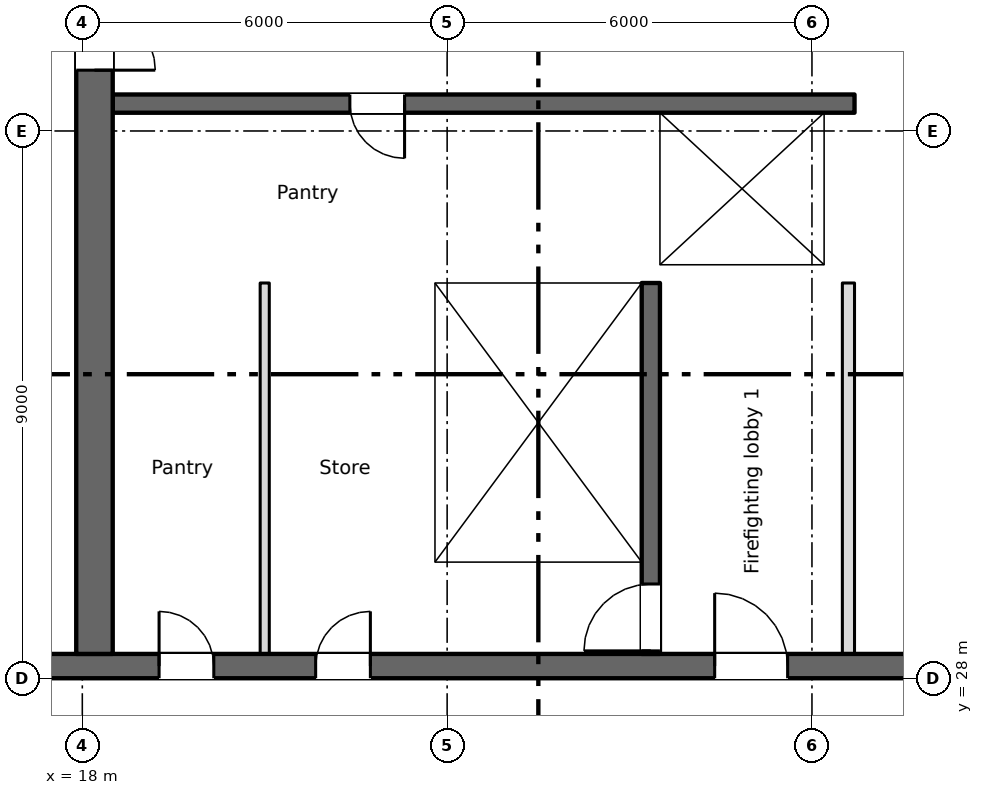
"""IFC4 building model, lengths in metres.
Left out: names, types, materials, properties, quantities, classifications, styles, units other than length and angle.
Written with IfcOpenShell. Run it as: python <this file> out.ifc"""

import sys

from ifc_helpers import new_model, si_unit, direction, frame, frame_2d, origin, place, context, subcontext, project, spatial, rectangle, extrude, element, fill, save


model = new_model("IFC4")
c1 = context("Model", 3, precision=1e-05, world=origin(), true_north=direction((0.0, 1.0)))
c2 = subcontext(c1, "Body", "Model", "MODEL_VIEW")
j1 = project(units=[si_unit("LENGTHUNIT", "METRE"), si_unit("PLANEANGLEUNIT", "RADIAN")], contexts=[c1])
p1 = place(None, origin())
s1 = spatial("IfcSite", under=j1, at=p1, CompositionType="ELEMENT")
p2 = place(p1, origin())
s2 = spatial("IfcBuilding", under=s1, at=p2, CompositionType="ELEMENT")
p3 = place(p2, frame((0.0, 0.0, 258.35)))
s3 = spatial("IfcBuildingStorey", under=s2, at=p3, CompositionType="ELEMENT", Elevation=258.35)
p4 = place(p3, frame((6.5, 28.2, 0.0), z_axis=(0.0, 0.0, 1.0), x_axis=(1.0, 0.0, 0.0)))
e1 = element("IfcWall", 1, at=p4, inside=s3, PredefinedType="SHEAR", context=c2, shape_type="SweptSolid", body=[
    extrude(rectangle(XDim=58.0, YDim=0.4, at=frame_2d((29.0, 0.0))), origin(), (0.0, 0.0, 1.0), 3.4),
])
p5 = place(p4, frame((12.762, 0.0, 0.0)))
e2 = element("IfcOpeningElement", 2, at=p5, cuts=e1, PredefinedType="OPENING", context=c2, shape_type="SweptSolid", body=[
    extrude(rectangle(XDim=0.9, YDim=2.1, at=frame_2d((0.45, 1.05))), frame((0.0, 0.21, 0.0), z_axis=(0.0, -1.0, 0.0), x_axis=(1.0, 0.0, 0.0)), (0.0, 0.0, 1.0), 0.42),
])
p6 = place(p4, frame((15.337, 0.0, 0.0)))
e3 = element("IfcOpeningElement", 3, at=p6, cuts=e1, PredefinedType="OPENING", context=c2, shape_type="SweptSolid", body=[
    extrude(rectangle(XDim=0.9, YDim=2.1, at=frame_2d((0.45, 1.05))), frame((0.0, 0.21, 0.0), z_axis=(0.0, -1.0, 0.0), x_axis=(1.0, 0.0, 0.0)), (0.0, 0.0, 1.0), 0.42),
])
p7 = place(p4, frame((50.05, 0.0, 0.0)))
e4 = element("IfcOpeningElement", 4, at=p7, cuts=e1, PredefinedType="OPENING", context=c2, shape_type="SweptSolid", body=[
    extrude(rectangle(XDim=0.9, YDim=2.1, at=frame_2d((0.45, 1.05))), frame((0.0, 0.21, 0.0), z_axis=(0.0, -1.0, 0.0), x_axis=(1.0, 0.0, 0.0)), (0.0, 0.0, 1.0), 0.42),
])
p8 = place(p4, frame((0.762, 0.0, 0.0)))
e5 = element("IfcOpeningElement", 5, at=p8, cuts=e1, PredefinedType="OPENING", context=c2, shape_type="SweptSolid", body=[
    extrude(rectangle(XDim=0.9, YDim=2.1, at=frame_2d((0.45, 1.05))), frame((0.0, 0.21, 0.0), z_axis=(0.0, -1.0, 0.0), x_axis=(1.0, 0.0, 0.0)), (0.0, 0.0, 1.0), 0.42),
])
p9 = place(p4, frame((2.337, 0.0, 0.0)))
e6 = element("IfcOpeningElement", 6, at=p9, cuts=e1, PredefinedType="OPENING", context=c2, shape_type="SweptSolid", body=[
    extrude(rectangle(XDim=0.9, YDim=2.1, at=frame_2d((0.45, 1.05))), frame((0.0, 0.21, 0.0), z_axis=(0.0, -1.0, 0.0), x_axis=(1.0, 0.0, 0.0)), (0.0, 0.0, 1.0), 0.42),
])
p10 = place(p4, frame((4.9, 0.0, 0.0)))
e7 = element("IfcOpeningElement", 7, at=p10, cuts=e1, PredefinedType="OPENING", context=c2, shape_type="SweptSolid", body=[
    extrude(rectangle(XDim=1.2, YDim=2.1, at=frame_2d((0.6, 1.05))), frame((0.0, 0.21, 0.0), z_axis=(0.0, -1.0, 0.0), x_axis=(1.0, 0.0, 0.0)), (0.0, 0.0, 1.0), 0.42),
])
p11 = place(p4, frame((31.9, 0.0, 0.0)))
e8 = element("IfcOpeningElement", 8, at=p11, cuts=e1, PredefinedType="OPENING", context=c2, shape_type="SweptSolid", body=[
    extrude(rectangle(XDim=1.2, YDim=2.1, at=frame_2d((0.6, 1.05))), frame((0.0, 0.21, 0.0), z_axis=(0.0, -1.0, 0.0), x_axis=(1.0, 0.0, 0.0)), (0.0, 0.0, 1.0), 0.42),
])
p12 = place(p4, frame((55.4, 0.0, 0.0)))
e9 = element("IfcOpeningElement", 9, at=p12, cuts=e1, PredefinedType="OPENING", context=c2, shape_type="SweptSolid", body=[
    extrude(rectangle(XDim=1.2, YDim=2.1, at=frame_2d((0.6, 1.05))), frame((0.0, 0.21, 0.0), z_axis=(0.0, -1.0, 0.0), x_axis=(1.0, 0.0, 0.0)), (0.0, 0.0, 1.0), 0.42),
])
p13 = place(p4, frame((21.9, 0.0, 0.0)))
e10 = element("IfcOpeningElement", 10, at=p13, cuts=e1, PredefinedType="OPENING", context=c2, shape_type="SweptSolid", body=[
    extrude(rectangle(XDim=1.2, YDim=2.1, at=frame_2d((0.6, 1.05))), frame((0.0, 0.21, 0.0), z_axis=(0.0, -1.0, 0.0), x_axis=(1.0, 0.0, 0.0)), (0.0, 0.0, 1.0), 0.42),
])
p14 = place(p4, frame((41.9, 0.0, 0.0)))
e11 = element("IfcOpeningElement", 11, at=p14, cuts=e1, PredefinedType="OPENING", context=c2, shape_type="SweptSolid", body=[
    extrude(rectangle(XDim=1.2, YDim=2.1, at=frame_2d((0.6, 1.05))), frame((0.0, 0.21, 0.0), z_axis=(0.0, -1.0, 0.0), x_axis=(1.0, 0.0, 0.0)), (0.0, 0.0, 1.0), 0.42),
])
p15 = place(p4, frame((25.05, 0.0, 0.0)))
e12 = element("IfcOpeningElement", 12, at=p15, cuts=e1, PredefinedType="OPENING", context=c2, shape_type="SweptSolid", body=[
    extrude(rectangle(XDim=2.4, YDim=2.1, at=frame_2d((1.2, 1.05))), frame((0.0, 0.21, 0.0), z_axis=(0.0, -1.0, 0.0), x_axis=(1.0, 0.0, 0.0)), (0.0, 0.0, 1.0), 0.42),
])
p16 = place(p4, frame((37.55, 0.0, 0.0)))
e13 = element("IfcOpeningElement", 13, at=p16, cuts=e1, PredefinedType="OPENING", context=c2, shape_type="SweptSolid", body=[
    extrude(rectangle(XDim=2.4, YDim=2.1, at=frame_2d((1.2, 1.05))), frame((0.0, 0.21, 0.0), z_axis=(0.0, -1.0, 0.0), x_axis=(1.0, 0.0, 0.0)), (0.0, 0.0, 1.0), 0.42),
])
p17 = place(p4, frame((8.25, 0.0, 0.0)))
e14 = element("IfcOpeningElement", 14, at=p17, cuts=e1, PredefinedType="OPENING", context=c2, shape_type="SweptSolid", body=[
    extrude(rectangle(XDim=2.4, YDim=2.1, at=frame_2d((1.2, 1.05))), frame((0.0, 0.21, 0.0), z_axis=(0.0, -1.0, 0.0), x_axis=(1.0, 0.0, 0.0)), (0.0, 0.0, 1.0), 0.42),
])
p18 = place(p4, frame((29.05, 0.0, 0.0)))
e15 = element("IfcOpeningElement", 15, at=p18, cuts=e1, PredefinedType="OPENING", context=c2, shape_type="SweptSolid", body=[
    extrude(rectangle(XDim=0.9, YDim=2.1, at=frame_2d((0.45, 1.05))), frame((0.0, 0.21, 0.0), z_axis=(0.0, -1.0, 0.0), x_axis=(1.0, 0.0, 0.0)), (0.0, 0.0, 1.0), 0.42),
])
p19 = place(p4, frame((35.05, 0.0, 0.0)))
e16 = element("IfcOpeningElement", 16, at=p19, cuts=e1, PredefinedType="OPENING", context=c2, shape_type="SweptSolid", body=[
    extrude(rectangle(XDim=0.9, YDim=2.1, at=frame_2d((0.45, 1.05))), frame((0.0, 0.21, 0.0), z_axis=(0.0, -1.0, 0.0), x_axis=(1.0, 0.0, 0.0)), (0.0, 0.0, 1.0), 0.42),
])
p20 = place(p3, frame((18.2, 28.4, 0.0), z_axis=(0.0, 0.0, 1.0), x_axis=(0.0, 1.0, 0.0)))
e17 = element("IfcWall", 17, at=p20, inside=s3, PredefinedType="SHEAR", context=c2, shape_type="SweptSolid", body=[
    extrude(rectangle(XDim=17.0, YDim=0.6, at=frame_2d((8.5, 0.0))), origin(), (0.0, 0.0, 1.0), 3.4),
])
p21 = place(p20, frame((9.6, 0.0, 0.0)))
e18 = element("IfcOpeningElement", 18, at=p21, cuts=e17, PredefinedType="OPENING", context=c2, shape_type="SweptSolid", body=[
    extrude(rectangle(XDim=2.0, YDim=2.1, at=frame_2d((1.0, 1.05))), frame((0.0, 0.31, 0.0), z_axis=(0.0, -1.0, 0.0), x_axis=(1.0, 0.0, 0.0)), (0.0, 0.0, 1.0), 0.62),
])
p22 = place(p20, frame((15.45, 0.0, 0.0)))
e19 = element("IfcOpeningElement", 19, at=p22, cuts=e17, PredefinedType="OPENING", context=c2, shape_type="SweptSolid", body=[
    extrude(rectangle(XDim=1.2, YDim=2.1, at=frame_2d((0.6, 1.05))), frame((0.0, 0.31, 0.0), z_axis=(0.0, -1.0, 0.0), x_axis=(1.0, 0.0, 0.0)), (0.0, 0.0, 1.0), 0.62),
])
p23 = place(p3, frame((23.65, 28.4, 0.0), z_axis=(0.0, 0.0, 1.0), x_axis=(0.0, 1.0, 0.0)))
e20 = element("IfcWall", 20, at=p23, inside=s3, PredefinedType="SHEAR", context=c2, shape_type="SweptSolid", body=[
    extrude(rectangle(XDim=6.1, YDim=0.3, at=frame_2d((3.05, 0.0))), origin(), (0.0, 0.0, 1.0), 3.4),
])
p24 = place(p3, frame((27.35, 28.4, 0.0), z_axis=(0.0, 0.0, 1.0), x_axis=(0.0, 1.0, 0.0)))
e21 = element("IfcWall", 21, at=p24, inside=s3, PredefinedType="SHEAR", context=c2, shape_type="SweptSolid", body=[
    extrude(rectangle(XDim=6.1, YDim=0.3, at=frame_2d((3.05, 0.0))), origin(), (0.0, 0.0, 1.0), 3.4),
])
p25 = place(p24, frame((0.05, 0.0, 0.0)))
e22 = element("IfcOpeningElement", 22, at=p25, cuts=e21, PredefinedType="OPENING", context=c2, shape_type="SweptSolid", body=[
    extrude(rectangle(XDim=1.1, YDim=2.1, at=frame_2d((0.55, 1.05))), frame((0.0, 0.16, 0.0), z_axis=(0.0, -1.0, 0.0), x_axis=(1.0, 0.0, 0.0)), (0.0, 0.0, 1.0), 0.32),
])
p26 = place(p3, frame((18.5, 34.65, 0.0), z_axis=(0.0, 0.0, 1.0), x_axis=(1.0, 0.0, 0.0)))
e23 = element("IfcWall", 23, at=p26, inside=s3, PredefinedType="SHEAR", context=c2, shape_type="SweptSolid", body=[
    extrude(rectangle(XDim=12.2, YDim=0.3, at=frame_2d((6.1, 0.0))), origin(), (0.0, 0.0, 1.0), 3.4),
])
p27 = place(p26, frame((9.8, 0.0, 0.0)))
e24 = element("IfcOpeningElement", 24, at=p27, cuts=e23, PredefinedType="OPENING", context=c2, shape_type="SweptSolid", body=[
    extrude(rectangle(XDim=1.1, YDim=2.1, at=frame_2d((0.55, 1.05))), frame((0.0, 0.16, 0.0), z_axis=(0.0, -1.0, 0.0), x_axis=(1.0, 0.0, 0.0)), (0.0, 0.0, 1.0), 0.32),
])
p28 = place(p3, frame((30.7, 37.45, 0.0), z_axis=(0.0, 0.0, 1.0), x_axis=(-1.0, 0.0, 0.0)))
e25 = element("IfcWall", 25, at=p28, inside=s3, PredefinedType="SHEAR", context=c2, shape_type="SweptSolid", body=[
    extrude(rectangle(XDim=12.2, YDim=0.3, at=frame_2d((6.1, 0.0))), origin(), (0.0, 0.0, 1.0), 3.4),
])
p29 = place(p28, frame((7.4, 0.0, 0.0)))
e26 = element("IfcOpeningElement", 26, at=p29, cuts=e25, PredefinedType="OPENING", context=c2, shape_type="SweptSolid", body=[
    extrude(rectangle(XDim=0.9, YDim=2.1, at=frame_2d((0.45, 1.05))), frame((0.0, 0.16, 0.0), z_axis=(0.0, -1.0, 0.0), x_axis=(1.0, 0.0, 0.0)), (0.0, 0.0, 1.0), 0.32),
])
p30 = place(p3, frame((27.35, 34.8, 0.0), z_axis=(0.0, 0.0, 1.0), x_axis=(0.0, 1.0, 0.0)))
e27 = element("IfcWall", 27, at=p30, inside=s3, PredefinedType="SHEAR", context=c2, shape_type="SweptSolid", body=[
    extrude(rectangle(XDim=2.5, YDim=0.3, at=frame_2d((1.25, 0.0))), origin(), (0.0, 0.0, 1.0), 3.4),
])
p31 = place(p3, frame((30.45, 34.8, 0.0), z_axis=(0.0, 0.0, 1.0), x_axis=(0.0, 1.0, 0.0)))
e28 = element("IfcWall", 28, at=p31, inside=s3, PredefinedType="SHEAR", context=c2, shape_type="SweptSolid", body=[
    extrude(rectangle(XDim=2.5, YDim=0.5, at=frame_2d((1.25, 0.0))), origin(), (0.0, 0.0, 1.0), 3.4),
])
p32 = place(p3, frame((30.6, 28.4, 0.0), z_axis=(0.0, 0.0, 1.0), x_axis=(0.0, 1.0, 0.0)))
e29 = element("IfcWall", 29, at=p32, inside=s3, PredefinedType="PARTITIONING", context=c2, shape_type="SweptSolid", body=[
    extrude(rectangle(XDim=6.1, YDim=0.2, at=frame_2d((3.05, 0.0))), origin(), (0.0, 0.0, 1.0), 3.4),
])
p33 = place(p3, frame((21.0, 28.4, 0.0), z_axis=(0.0, 0.0, 1.0), x_axis=(0.0, 1.0, 0.0)))
e30 = element("IfcWall", 30, at=p33, inside=s3, PredefinedType="PARTITIONING", context=c2, shape_type="SweptSolid", body=[
    extrude(rectangle(XDim=6.1, YDim=0.15, at=frame_2d((3.05, 0.0))), origin(), (0.0, 0.0, 1.0), 3.4),
])
p34 = place(p5, origin())
e31 = element("IfcDoor", 31, at=p34, inside=s3, OperationType="SINGLE_SWING_LEFT", PredefinedType="DOOR", context=c2, shape_type="SweptSolid", body=[
    extrude(rectangle(XDim=0.9, YDim=2.1, at=frame_2d((0.45, 1.05))), frame((0.0, 0.025, 0.0), z_axis=(0.0, -1.0, 0.0), x_axis=(1.0, 0.0, 0.0)), (0.0, 0.0, 1.0), 0.05),
])
fill(e2, e31)
p35 = place(p6, origin())
e32 = element("IfcDoor", 32, at=p35, inside=s3, OperationType="SINGLE_SWING_RIGHT", PredefinedType="DOOR", context=c2, shape_type="SweptSolid", body=[
    extrude(rectangle(XDim=0.9, YDim=2.1, at=frame_2d((0.45, 1.05))), frame((0.0, 0.025, 0.0), z_axis=(0.0, -1.0, 0.0), x_axis=(1.0, 0.0, 0.0)), (0.0, 0.0, 1.0), 0.05),
])
fill(e3, e32)
p36 = place(p29, origin())
e33 = element("IfcDoor", 33, at=p36, inside=s3, OperationType="SINGLE_SWING_LEFT", PredefinedType="DOOR", context=c2, shape_type="SweptSolid", body=[
    extrude(rectangle(XDim=0.9, YDim=2.1, at=frame_2d((0.45, 1.05))), frame((0.0, 0.025, 0.0), z_axis=(0.0, -1.0, 0.0), x_axis=(1.0, 0.0, 0.0)), (0.0, 0.0, 1.0), 0.05),
])
fill(e26, e33)
p37 = place(p27, origin())
e34 = element("IfcDoor", 34, at=p37, inside=s3, OperationType="SLIDING_TO_LEFT", PredefinedType="DOOR", context=c2, shape_type="SweptSolid", body=[
    extrude(rectangle(XDim=1.1, YDim=2.1, at=frame_2d((0.55, 1.05))), frame((0.0, 0.025, 0.0), z_axis=(0.0, -1.0, 0.0), x_axis=(1.0, 0.0, 0.0)), (0.0, 0.0, 1.0), 0.05),
])
fill(e24, e34)
p38 = place(p25, origin())
e35 = element("IfcDoor", 35, at=p38, inside=s3, OperationType="SINGLE_SWING_LEFT", PredefinedType="DOOR", context=c2, shape_type="SweptSolid", body=[
    extrude(rectangle(XDim=1.1, YDim=2.1, at=frame_2d((0.55, 1.05))), frame((0.0, 0.025, 0.0), z_axis=(0.0, -1.0, 0.0), x_axis=(1.0, 0.0, 0.0)), (0.0, 0.0, 1.0), 0.05),
])
fill(e22, e35)
p39 = place(p13, origin())
e36 = element("IfcDoor", 36, at=p39, inside=s3, OperationType="SINGLE_SWING_LEFT", PredefinedType="DOOR", context=c2, shape_type="SweptSolid", body=[
    extrude(rectangle(XDim=1.2, YDim=2.1, at=frame_2d((0.6, 1.05))), frame((0.0, 0.025, 0.0), z_axis=(0.0, -1.0, 0.0), x_axis=(1.0, 0.0, 0.0)), (0.0, 0.0, 1.0), 0.05),
])
fill(e10, e36)
p40 = place(p21, origin())
e37 = element("IfcDoor", 37, at=p40, inside=s3, OperationType="DOUBLE_DOOR_SINGLE_SWING", PredefinedType="DOOR", context=c2, shape_type="SweptSolid", body=[
    extrude(rectangle(XDim=2.0, YDim=2.1, at=frame_2d((1.0, 1.05))), frame((0.0, 0.025, 0.0), z_axis=(0.0, -1.0, 0.0), x_axis=(1.0, 0.0, 0.0)), (0.0, 0.0, 1.0), 0.05),
])
fill(e18, e37)
save(model, sys.argv[1])
